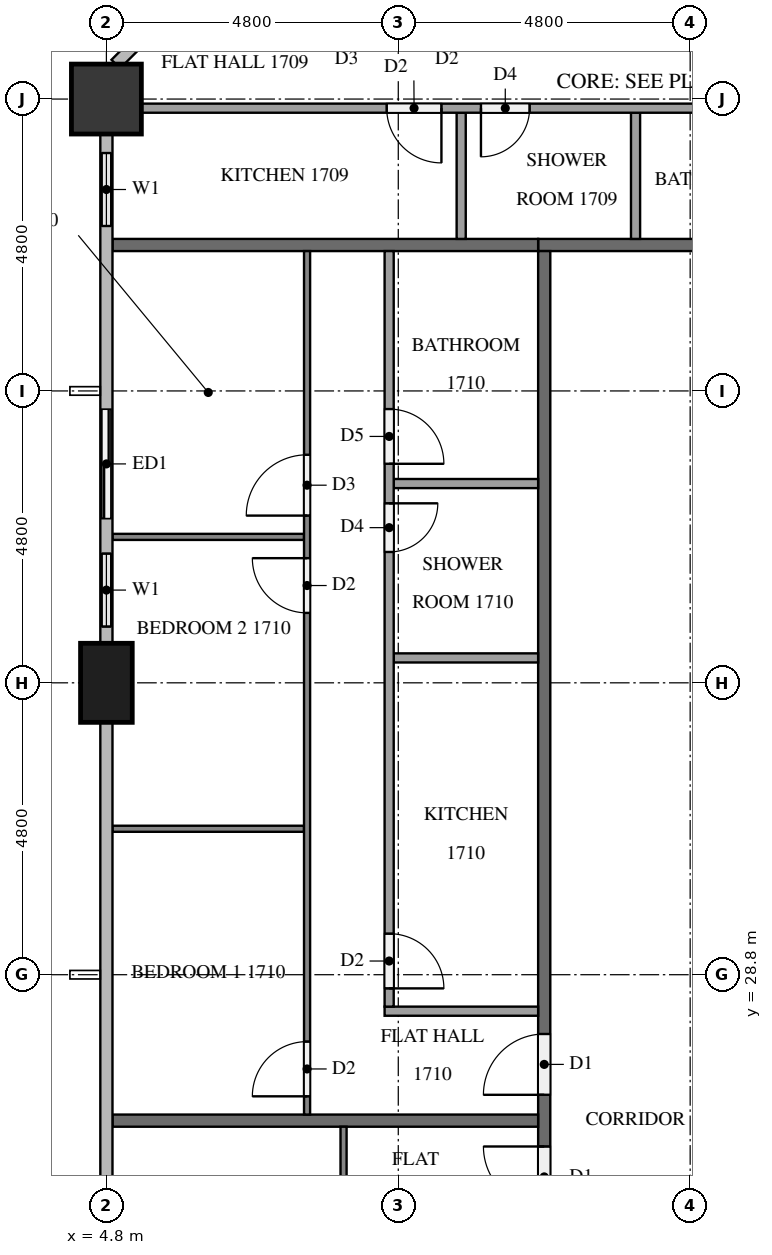
"""IFC4 building model, lengths in metres.
Left out: names, types, materials, properties, quantities, classifications, styles, units other than length and angle.
Written with IfcOpenShell. Run it as: python <this file> out.ifc"""

import sys

from ifc_helpers import new_model, si_unit, direction, frame, frame_2d, origin, origin_2d, place, context, subcontext, project, spatial, rectangle, extrude, element, fill, save


model = new_model("IFC4")
c1 = context("Model", 3, precision=1e-05, world=origin(), true_north=direction((0.0, 1.0)))
c2 = subcontext(c1, "Body", "Model", "MODEL_VIEW")
j1 = project(units=[si_unit("LENGTHUNIT", "METRE"), si_unit("PLANEANGLEUNIT", "RADIAN")], contexts=[c1])
p1 = place(None, origin())
s1 = spatial("IfcSite", under=j1, at=p1, CompositionType="ELEMENT")
p2 = place(p1, origin())
s2 = spatial("IfcBuilding", under=s1, at=p2, CompositionType="ELEMENT")
p3 = place(p2, frame((0.0, 0.0, 69.8)))
s3 = spatial("IfcBuildingStorey", under=s2, at=p3, CompositionType="ELEMENT", Elevation=69.8)
p4 = place(p3, frame((4.8, 43.2, 0.0), z_axis=(0.0, 0.0, 1.0), x_axis=(1.0, 0.0, 0.0)))
e1 = element("IfcColumn", 1, at=p4, inside=s3, PredefinedType="COLUMN", context=c2, shape_type="SweptSolid", body=[
    extrude(rectangle(XDim=1.15, YDim=1.15, at=origin_2d()), origin(), (0.0, 0.0, 1.0), 3.2),
])
p5 = place(p3, frame((4.8, 33.6, 0.0), z_axis=(0.0, 0.0, 1.0), x_axis=(0.0, 1.0, 0.0)))
e2 = element("IfcColumn", 2, at=p5, inside=s3, PredefinedType="COLUMN", context=c2, shape_type="SweptSolid", body=[
    extrude(rectangle(XDim=1.3, YDim=0.85, at=origin_2d()), origin(), (0.0, 0.0, 1.0), 3.2),
])
p6 = place(p3, frame((4.8, 42.625, 0.0), z_axis=(0.0, 0.0, 1.0), x_axis=(0.0, -1.0, 0.0)))
e3 = element("IfcWall", 3, at=p6, inside=s3, PredefinedType="SOLIDWALL", context=c2, shape_type="SweptSolid", body=[
    extrude(rectangle(XDim=1.825, YDim=0.15, at=frame_2d((0.913, 0.0))), origin(), (0.0, 0.0, 1.0), 3.2),
])
p7 = place(p6, frame((0.312, 0.0, 0.9)))
e4 = element("IfcOpeningElement", 4, at=p7, cuts=e3, PredefinedType="OPENING", context=c2, shape_type="SweptSolid", body=[
    extrude(rectangle(XDim=1.2, YDim=1.4, at=frame_2d((0.6, 0.7))), frame((0.0, 0.085, 0.0), z_axis=(0.0, -1.0, 0.0), x_axis=(1.0, 0.0, 0.0)), (0.0, 0.0, 1.0), 0.17),
])
p8 = place(p3, frame((4.8, 38.4, 0.0), z_axis=(0.0, 0.0, 1.0), x_axis=(0.0, -1.0, 0.0)))
e5 = element("IfcWall", 5, at=p8, inside=s3, PredefinedType="SOLIDWALL", context=c2, shape_type="SweptSolid", body=[
    extrude(rectangle(XDim=4.15, YDim=0.15, at=frame_2d((2.075, 0.0))), origin(), (0.0, 0.0, 1.0), 3.2),
])
p9 = place(p8, frame((0.3, 0.0, 0.0)))
e6 = element("IfcOpeningElement", 6, at=p9, cuts=e5, PredefinedType="OPENING", context=c2, shape_type="SweptSolid", body=[
    extrude(rectangle(XDim=1.8, YDim=2.4, at=frame_2d((0.9, 1.2))), frame((0.0, 0.085, 0.0), z_axis=(0.0, -1.0, 0.0), x_axis=(1.0, 0.0, 0.0)), (0.0, 0.0, 1.0), 0.17),
])
p10 = place(p8, frame((2.675, 0.0, 0.9)))
e7 = element("IfcOpeningElement", 7, at=p10, cuts=e5, PredefinedType="OPENING", context=c2, shape_type="SweptSolid", body=[
    extrude(rectangle(XDim=1.2, YDim=1.4, at=frame_2d((0.6, 0.7))), frame((0.0, 0.085, 0.0), z_axis=(0.0, -1.0, 0.0), x_axis=(1.0, 0.0, 0.0)), (0.0, 0.0, 1.0), 0.17),
])
p11 = place(p3, frame((11.9, 40.8, 0.0), z_axis=(0.0, 0.0, 1.0), x_axis=(1.0, 0.0, 0.0)))
e8 = element("IfcWall", 8, at=p11, inside=s3, PredefinedType="PARTITIONING", context=c2, shape_type="SweptSolid", body=[
    extrude(rectangle(XDim=38.6, YDim=0.2, at=frame_2d((19.3, 0.0))), origin(), (0.0, 0.0, 1.0), 3.2),
])
p12 = place(p11, frame((22.125, 0.0, 0.0)))
e9 = element("IfcOpeningElement", 9, at=p12, cuts=e8, PredefinedType="OPENING", context=c2, shape_type="SweptSolid", body=[
    extrude(rectangle(XDim=1.0, YDim=2.1, at=frame_2d((0.5, 1.05))), frame((0.0, 0.11, 0.0), z_axis=(0.0, -1.0, 0.0), x_axis=(1.0, 0.0, 0.0)), (0.0, 0.0, 1.0), 0.22),
])
p13 = place(p11, frame((7.725, 0.0, 0.0)))
e10 = element("IfcOpeningElement", 10, at=p13, cuts=e8, PredefinedType="OPENING", context=c2, shape_type="SweptSolid", body=[
    extrude(rectangle(XDim=1.0, YDim=2.1, at=frame_2d((0.5, 1.05))), frame((0.0, 0.11, 0.0), z_axis=(0.0, -1.0, 0.0), x_axis=(1.0, 0.0, 0.0)), (0.0, 0.0, 1.0), 0.22),
])
p14 = place(p11, frame((5.875, 0.0, 0.0)))
e11 = element("IfcOpeningElement", 11, at=p14, cuts=e8, PredefinedType="OPENING", context=c2, shape_type="SweptSolid", body=[
    extrude(rectangle(XDim=1.0, YDim=2.1, at=frame_2d((0.5, 1.05))), frame((0.0, 0.11, 0.0), z_axis=(0.0, -1.0, 0.0), x_axis=(1.0, 0.0, 0.0)), (0.0, 0.0, 1.0), 0.22),
])
p15 = place(p3, frame((12.0, 12.1, 0.0), z_axis=(0.0, 0.0, 1.0), x_axis=(0.0, 1.0, 0.0)))
e12 = element("IfcWall", 12, at=p15, inside=s3, PredefinedType="PARTITIONING", context=c2, shape_type="SweptSolid", body=[
    extrude(rectangle(XDim=28.6, YDim=0.2, at=frame_2d((14.3, 0.0))), origin(), (0.0, 0.0, 1.0), 3.2),
])
p16 = place(p15, frame((14.725, 0.0, 0.0)))
e13 = element("IfcOpeningElement", 13, at=p16, cuts=e12, PredefinedType="OPENING", context=c2, shape_type="SweptSolid", body=[
    extrude(rectangle(XDim=1.0, YDim=2.1, at=frame_2d((0.5, 1.05))), frame((0.0, 0.11, 0.0), z_axis=(0.0, -1.0, 0.0), x_axis=(1.0, 0.0, 0.0)), (0.0, 0.0, 1.0), 0.22),
])
p17 = place(p15, frame((12.875, 0.0, 0.0)))
e14 = element("IfcOpeningElement", 14, at=p17, cuts=e12, PredefinedType="OPENING", context=c2, shape_type="SweptSolid", body=[
    extrude(rectangle(XDim=1.0, YDim=2.1, at=frame_2d((0.5, 1.05))), frame((0.0, 0.11, 0.0), z_axis=(0.0, -1.0, 0.0), x_axis=(1.0, 0.0, 0.0)), (0.0, 0.0, 1.0), 0.22),
])
p18 = place(p15, frame((0.875, 0.0, 0.0)))
e15 = element("IfcOpeningElement", 15, at=p18, cuts=e12, PredefinedType="OPENING", context=c2, shape_type="SweptSolid", body=[
    extrude(rectangle(XDim=1.0, YDim=2.1, at=frame_2d((0.5, 1.05))), frame((0.0, 0.11, 0.0), z_axis=(0.0, -1.0, 0.0), x_axis=(1.0, 0.0, 0.0)), (0.0, 0.0, 1.0), 0.22),
])
for number, where, z_axis, x_axis in (
    (16, (4.9, 40.8, 0.0), (0.0, 0.0, 1.0), (1.0, 0.0, 0.0)),
    (17, (4.9, 26.4, 0.0), (0.0, 0.0, 1.0), (1.0, 0.0, 0.0)),
):
    element("IfcWall", number, at=place(p3, frame(where, z_axis=z_axis, x_axis=x_axis)), inside=s3, PredefinedType="PARTITIONING", context=c2, shape_type="SweptSolid", body=[
        extrude(rectangle(XDim=7.0, YDim=0.2, at=frame_2d((3.5, 0.0))), origin(), (0.0, 0.0, 1.0), 3.2),
    ])
for number, where, z_axis, x_axis in (
    (18, (13.502, 40.9, 0.0), (0.0, 0.0, 1.0), (0.0, 1.0, 0.0)),
    (19, (10.635, 40.9, 0.0), (0.0, 0.0, 1.0), (0.0, 1.0, 0.0)),
):
    element("IfcWall", number, at=place(p3, frame(where, z_axis=z_axis, x_axis=x_axis)), inside=s3, PredefinedType="PARTITIONING", context=c2, shape_type="SweptSolid", body=[
        extrude(rectangle(XDim=2.075, YDim=0.15, at=frame_2d((1.038, 0.0))), origin(), (0.0, 0.0, 1.0), 3.2),
    ])
p19 = place(p3, frame((17.325, 43.05, 0.0), z_axis=(0.0, 0.0, 1.0), x_axis=(-1.0, 0.0, 0.0)))
e20 = element("IfcWall", 20, at=p19, inside=s3, PredefinedType="PARTITIONING", context=c2, shape_type="SweptSolid", body=[
    extrude(rectangle(XDim=11.95, YDim=0.15, at=frame_2d((5.975, 0.0))), origin(), (0.0, 0.0, 1.0), 3.2),
])
p20 = place(p19, frame((0.3, 0.0, 0.0)))
e21 = element("IfcOpeningElement", 21, at=p20, cuts=e20, PredefinedType="OPENING", context=c2, shape_type="SweptSolid", body=[
    extrude(rectangle(XDim=0.9, YDim=2.1, at=frame_2d((0.45, 1.05))), frame((0.0, 0.085, 0.0), z_axis=(0.0, -1.0, 0.0), x_axis=(1.0, 0.0, 0.0)), (0.0, 0.0, 1.0), 0.17),
])
p21 = place(p19, frame((5.565, 0.0, 0.0)))
e22 = element("IfcOpeningElement", 22, at=p21, cuts=e20, PredefinedType="OPENING", context=c2, shape_type="SweptSolid", body=[
    extrude(rectangle(XDim=0.8, YDim=2.1, at=frame_2d((0.4, 1.05))), frame((0.0, 0.085, 0.0), z_axis=(0.0, -1.0, 0.0), x_axis=(1.0, 0.0, 0.0)), (0.0, 0.0, 1.0), 0.17),
])
p22 = place(p19, frame((7.015, 0.0, 0.0)))
e23 = element("IfcOpeningElement", 23, at=p22, cuts=e20, PredefinedType="OPENING", context=c2, shape_type="SweptSolid", body=[
    extrude(rectangle(XDim=0.9, YDim=2.1, at=frame_2d((0.45, 1.05))), frame((0.0, 0.085, 0.0), z_axis=(0.0, -1.0, 0.0), x_axis=(1.0, 0.0, 0.0)), (0.0, 0.0, 1.0), 0.17),
])
for number, where, z_axis, x_axis in (
    (24, (8.05, 31.2, 0.0), (0.0, 0.0, 1.0), (-1.0, 0.0, 0.0)),
    (25, (8.05, 36.0, 0.0), (0.0, 0.0, 1.0), (-1.0, 0.0, 0.0)),
):
    element("IfcWall", number, at=place(p3, frame(where, z_axis=z_axis, x_axis=x_axis)), inside=s3, PredefinedType="PARTITIONING", context=c2, shape_type="SweptSolid", body=[
        extrude(rectangle(XDim=3.15, YDim=0.1, at=frame_2d((1.575, 0.0))), origin(), (0.0, 0.0, 1.0), 3.2),
    ])
p23 = place(p3, frame((8.1, 26.5, 0.0), z_axis=(0.0, 0.0, 1.0), x_axis=(0.0, 1.0, 0.0)))
e26 = element("IfcWall", 26, at=p23, inside=s3, PredefinedType="PARTITIONING", context=c2, shape_type="SweptSolid", body=[
    extrude(rectangle(XDim=14.2, YDim=0.1, at=frame_2d((7.1, 0.0))), origin(), (0.0, 0.0, 1.0), 3.2),
])
p24 = place(p23, frame((0.3, 0.0, 0.0)))
e27 = element("IfcOpeningElement", 27, at=p24, cuts=e26, PredefinedType="OPENING", context=c2, shape_type="SweptSolid", body=[
    extrude(rectangle(XDim=0.9, YDim=2.1, at=frame_2d((0.45, 1.05))), frame((0.0, 0.06, 0.0), z_axis=(0.0, -1.0, 0.0), x_axis=(1.0, 0.0, 0.0)), (0.0, 0.0, 1.0), 0.12),
])
p25 = place(p23, frame((8.25, 0.0, 0.0)))
e28 = element("IfcOpeningElement", 28, at=p25, cuts=e26, PredefinedType="OPENING", context=c2, shape_type="SweptSolid", body=[
    extrude(rectangle(XDim=0.9, YDim=2.1, at=frame_2d((0.45, 1.05))), frame((0.0, 0.06, 0.0), z_axis=(0.0, -1.0, 0.0), x_axis=(1.0, 0.0, 0.0)), (0.0, 0.0, 1.0), 0.12),
])
p26 = place(p23, frame((9.85, 0.0, 0.0)))
e29 = element("IfcOpeningElement", 29, at=p26, cuts=e26, PredefinedType="OPENING", context=c2, shape_type="SweptSolid", body=[
    extrude(rectangle(XDim=1.0, YDim=2.1, at=frame_2d((0.5, 1.05))), frame((0.0, 0.06, 0.0), z_axis=(0.0, -1.0, 0.0), x_axis=(1.0, 0.0, 0.0)), (0.0, 0.0, 1.0), 0.12),
])
for number, where, z_axis, x_axis in (
    (30, (11.9, 34.01, 0.0), (0.0, 0.0, 1.0), (-1.0, 0.0, 0.0)),
    (31, (11.9, 36.877, 0.0), (0.0, 0.0, 1.0), (-1.0, 0.0, 0.0)),
):
    element("IfcWall", number, at=place(p3, frame(where, z_axis=z_axis, x_axis=x_axis)), inside=s3, PredefinedType="PARTITIONING", context=c2, shape_type="SweptSolid", body=[
        extrude(rectangle(XDim=2.375, YDim=0.15, at=frame_2d((1.188, 0.0))), origin(), (0.0, 0.0, 1.0), 3.2),
    ])
p27 = place(p3, frame((11.9, 28.2, 0.0), z_axis=(0.0, 0.0, 1.0), x_axis=(-1.0, 0.0, 0.0)))
e32 = element("IfcWall", 32, at=p27, inside=s3, PredefinedType="PARTITIONING", context=c2, shape_type="SweptSolid", body=[
    extrude(rectangle(XDim=2.525, YDim=0.15, at=frame_2d((1.262, 0.0))), origin(), (0.0, 0.0, 1.0), 3.2),
])
p28 = place(p3, frame((9.45, 40.7, 0.0), z_axis=(0.0, 0.0, 1.0), x_axis=(0.0, -1.0, 0.0)))
e33 = element("IfcWall", 33, at=p28, inside=s3, PredefinedType="PARTITIONING", context=c2, shape_type="SweptSolid", body=[
    extrude(rectangle(XDim=12.425, YDim=0.15, at=frame_2d((6.212, 0.0))), origin(), (0.0, 0.0, 1.0), 3.2),
])
p29 = place(p28, frame((11.225, 0.0, 0.0)))
e34 = element("IfcOpeningElement", 34, at=p29, cuts=e33, PredefinedType="OPENING", context=c2, shape_type="SweptSolid", body=[
    extrude(rectangle(XDim=0.9, YDim=2.1, at=frame_2d((0.45, 1.05))), frame((0.0, 0.085, 0.0), z_axis=(0.0, -1.0, 0.0), x_axis=(1.0, 0.0, 0.0)), (0.0, 0.0, 1.0), 0.17),
])
p30 = place(p28, frame((4.148, 0.0, 0.0)))
e35 = element("IfcOpeningElement", 35, at=p30, cuts=e33, PredefinedType="OPENING", context=c2, shape_type="SweptSolid", body=[
    extrude(rectangle(XDim=0.8, YDim=2.1, at=frame_2d((0.4, 1.05))), frame((0.0, 0.085, 0.0), z_axis=(0.0, -1.0, 0.0), x_axis=(1.0, 0.0, 0.0)), (0.0, 0.0, 1.0), 0.17),
])
p31 = place(p28, frame((2.598, 0.0, 0.0)))
e36 = element("IfcOpeningElement", 36, at=p31, cuts=e33, PredefinedType="OPENING", context=c2, shape_type="SweptSolid", body=[
    extrude(rectangle(XDim=0.9, YDim=2.1, at=frame_2d((0.45, 1.05))), frame((0.0, 0.085, 0.0), z_axis=(0.0, -1.0, 0.0), x_axis=(1.0, 0.0, 0.0)), (0.0, 0.0, 1.0), 0.17),
])
p32 = place(p3, frame((8.7, 14.5, 0.0), z_axis=(0.0, 0.0, 1.0), x_axis=(0.0, 1.0, 0.0)))
e37 = element("IfcWall", 37, at=p32, inside=s3, PredefinedType="PARTITIONING", context=c2, shape_type="SweptSolid", body=[
    extrude(rectangle(XDim=11.8, YDim=0.1, at=frame_2d((5.9, 0.0))), origin(), (0.0, 0.0, 1.0), 3.2),
])
p33 = place(p32, frame((5.05, 0.0, 0.0)))
e38 = element("IfcOpeningElement", 38, at=p33, cuts=e37, PredefinedType="OPENING", context=c2, shape_type="SweptSolid", body=[
    extrude(rectangle(XDim=1.0, YDim=2.1, at=frame_2d((0.5, 1.05))), frame((0.0, 0.06, 0.0), z_axis=(0.0, -1.0, 0.0), x_axis=(1.0, 0.0, 0.0)), (0.0, 0.0, 1.0), 0.12),
])
p34 = place(p32, frame((3.45, 0.0, 0.0)))
e39 = element("IfcOpeningElement", 39, at=p34, cuts=e37, PredefinedType="OPENING", context=c2, shape_type="SweptSolid", body=[
    extrude(rectangle(XDim=0.9, YDim=2.1, at=frame_2d((0.45, 1.05))), frame((0.0, 0.06, 0.0), z_axis=(0.0, -1.0, 0.0), x_axis=(1.0, 0.0, 0.0)), (0.0, 0.0, 1.0), 0.12),
])
p35 = place(p7, origin())
e40 = element("IfcWindow", 40, at=p35, inside=s3, PartitioningType="SINGLE_PANEL", PredefinedType="WINDOW", context=c2, shape_type="SweptSolid", body=[
    extrude(rectangle(XDim=1.2, YDim=1.4, at=frame_2d((0.6, 0.7))), frame((0.0, 0.03, 0.0), z_axis=(0.0, -1.0, 0.0), x_axis=(1.0, 0.0, 0.0)), (0.0, 0.0, 1.0), 0.06),
])
fill(e4, e40)
p36 = place(p9, origin())
e41 = element("IfcDoor", 41, at=p36, inside=s3, OperationType="SLIDING_TO_RIGHT", PredefinedType="DOOR", context=c2, shape_type="SweptSolid", body=[
    extrude(rectangle(XDim=1.8, YDim=2.4, at=frame_2d((0.9, 1.2))), frame((0.0, 0.025, 0.0), z_axis=(0.0, -1.0, 0.0), x_axis=(1.0, 0.0, 0.0)), (0.0, 0.0, 1.0), 0.05),
])
fill(e6, e41)
p37 = place(p10, origin())
e42 = element("IfcWindow", 42, at=p37, inside=s3, PartitioningType="SINGLE_PANEL", PredefinedType="WINDOW", context=c2, shape_type="SweptSolid", body=[
    extrude(rectangle(XDim=1.2, YDim=1.4, at=frame_2d((0.6, 0.7))), frame((0.0, 0.03, 0.0), z_axis=(0.0, -1.0, 0.0), x_axis=(1.0, 0.0, 0.0)), (0.0, 0.0, 1.0), 0.06),
])
fill(e7, e42)
p38 = place(p16, origin())
e43 = element("IfcDoor", 43, at=p38, inside=s3, OperationType="SINGLE_SWING_LEFT", PredefinedType="DOOR", context=c2, shape_type="SweptSolid", body=[
    extrude(rectangle(XDim=1.0, YDim=2.1, at=frame_2d((0.5, 1.05))), frame((0.0, 0.025, 0.0), z_axis=(0.0, -1.0, 0.0), x_axis=(1.0, 0.0, 0.0)), (0.0, 0.0, 1.0), 0.05),
])
fill(e13, e43)
p39 = place(p17, origin())
e44 = element("IfcDoor", 44, at=p39, inside=s3, OperationType="SINGLE_SWING_RIGHT", PredefinedType="DOOR", context=c2, shape_type="SweptSolid", body=[
    extrude(rectangle(XDim=1.0, YDim=2.1, at=frame_2d((0.5, 1.05))), frame((0.0, 0.025, 0.0), z_axis=(0.0, -1.0, 0.0), x_axis=(1.0, 0.0, 0.0)), (0.0, 0.0, 1.0), 0.05),
])
fill(e14, e44)
p40 = place(p21, origin())
e45 = element("IfcDoor", 45, at=p40, inside=s3, OperationType="SINGLE_SWING_RIGHT", PredefinedType="DOOR", context=c2, shape_type="SweptSolid", body=[
    extrude(rectangle(XDim=0.8, YDim=2.1, at=frame_2d((0.4, 1.05))), frame((0.0, 0.025, 0.0), z_axis=(0.0, -1.0, 0.0), x_axis=(1.0, 0.0, 0.0)), (0.0, 0.0, 1.0), 0.05),
])
fill(e22, e45)
p41 = place(p22, origin())
e46 = element("IfcDoor", 46, at=p41, inside=s3, OperationType="SINGLE_SWING_LEFT", PredefinedType="DOOR", context=c2, shape_type="SweptSolid", body=[
    extrude(rectangle(XDim=0.9, YDim=2.1, at=frame_2d((0.45, 1.05))), frame((0.0, 0.025, 0.0), z_axis=(0.0, -1.0, 0.0), x_axis=(1.0, 0.0, 0.0)), (0.0, 0.0, 1.0), 0.05),
])
fill(e23, e46)
p42 = place(p24, origin())
e47 = element("IfcDoor", 47, at=p42, inside=s3, OperationType="SINGLE_SWING_LEFT", PredefinedType="DOOR", context=c2, shape_type="SweptSolid", body=[
    extrude(rectangle(XDim=0.9, YDim=2.1, at=frame_2d((0.45, 1.05))), frame((0.0, 0.025, 0.0), z_axis=(0.0, -1.0, 0.0), x_axis=(1.0, 0.0, 0.0)), (0.0, 0.0, 1.0), 0.05),
])
fill(e27, e47)
p43 = place(p25, origin())
e48 = element("IfcDoor", 48, at=p43, inside=s3, OperationType="SINGLE_SWING_RIGHT", PredefinedType="DOOR", context=c2, shape_type="SweptSolid", body=[
    extrude(rectangle(XDim=0.9, YDim=2.1, at=frame_2d((0.45, 1.05))), frame((0.0, 0.025, 0.0), z_axis=(0.0, -1.0, 0.0), x_axis=(1.0, 0.0, 0.0)), (0.0, 0.0, 1.0), 0.05),
])
fill(e28, e48)
p44 = place(p26, origin())
e49 = element("IfcDoor", 49, at=p44, inside=s3, OperationType="SINGLE_SWING_LEFT", PredefinedType="DOOR", context=c2, shape_type="SweptSolid", body=[
    extrude(rectangle(XDim=1.0, YDim=2.1, at=frame_2d((0.5, 1.05))), frame((0.0, 0.025, 0.0), z_axis=(0.0, -1.0, 0.0), x_axis=(1.0, 0.0, 0.0)), (0.0, 0.0, 1.0), 0.05),
])
fill(e29, e49)
p45 = place(p29, origin())
e50 = element("IfcDoor", 50, at=p45, inside=s3, OperationType="SINGLE_SWING_RIGHT", PredefinedType="DOOR", context=c2, shape_type="SweptSolid", body=[
    extrude(rectangle(XDim=0.9, YDim=2.1, at=frame_2d((0.45, 1.05))), frame((0.0, 0.025, 0.0), z_axis=(0.0, -1.0, 0.0), x_axis=(1.0, 0.0, 0.0)), (0.0, 0.0, 1.0), 0.05),
])
fill(e34, e50)
p46 = place(p30, origin())
e51 = element("IfcDoor", 51, at=p46, inside=s3, OperationType="SINGLE_SWING_LEFT", PredefinedType="DOOR", context=c2, shape_type="SweptSolid", body=[
    extrude(rectangle(XDim=0.8, YDim=2.1, at=frame_2d((0.4, 1.05))), frame((0.0, 0.025, 0.0), z_axis=(0.0, -1.0, 0.0), x_axis=(1.0, 0.0, 0.0)), (0.0, 0.0, 1.0), 0.05),
])
fill(e35, e51)
p47 = place(p31, origin())
e52 = element("IfcDoor", 52, at=p47, inside=s3, OperationType="SINGLE_SWING_RIGHT", PredefinedType="DOOR", context=c2, shape_type="SweptSolid", body=[
    extrude(rectangle(XDim=0.9, YDim=2.1, at=frame_2d((0.45, 1.05))), frame((0.0, 0.025, 0.0), z_axis=(0.0, -1.0, 0.0), x_axis=(1.0, 0.0, 0.0)), (0.0, 0.0, 1.0), 0.05),
])
fill(e36, e52)
save(model, sys.argv[1])
